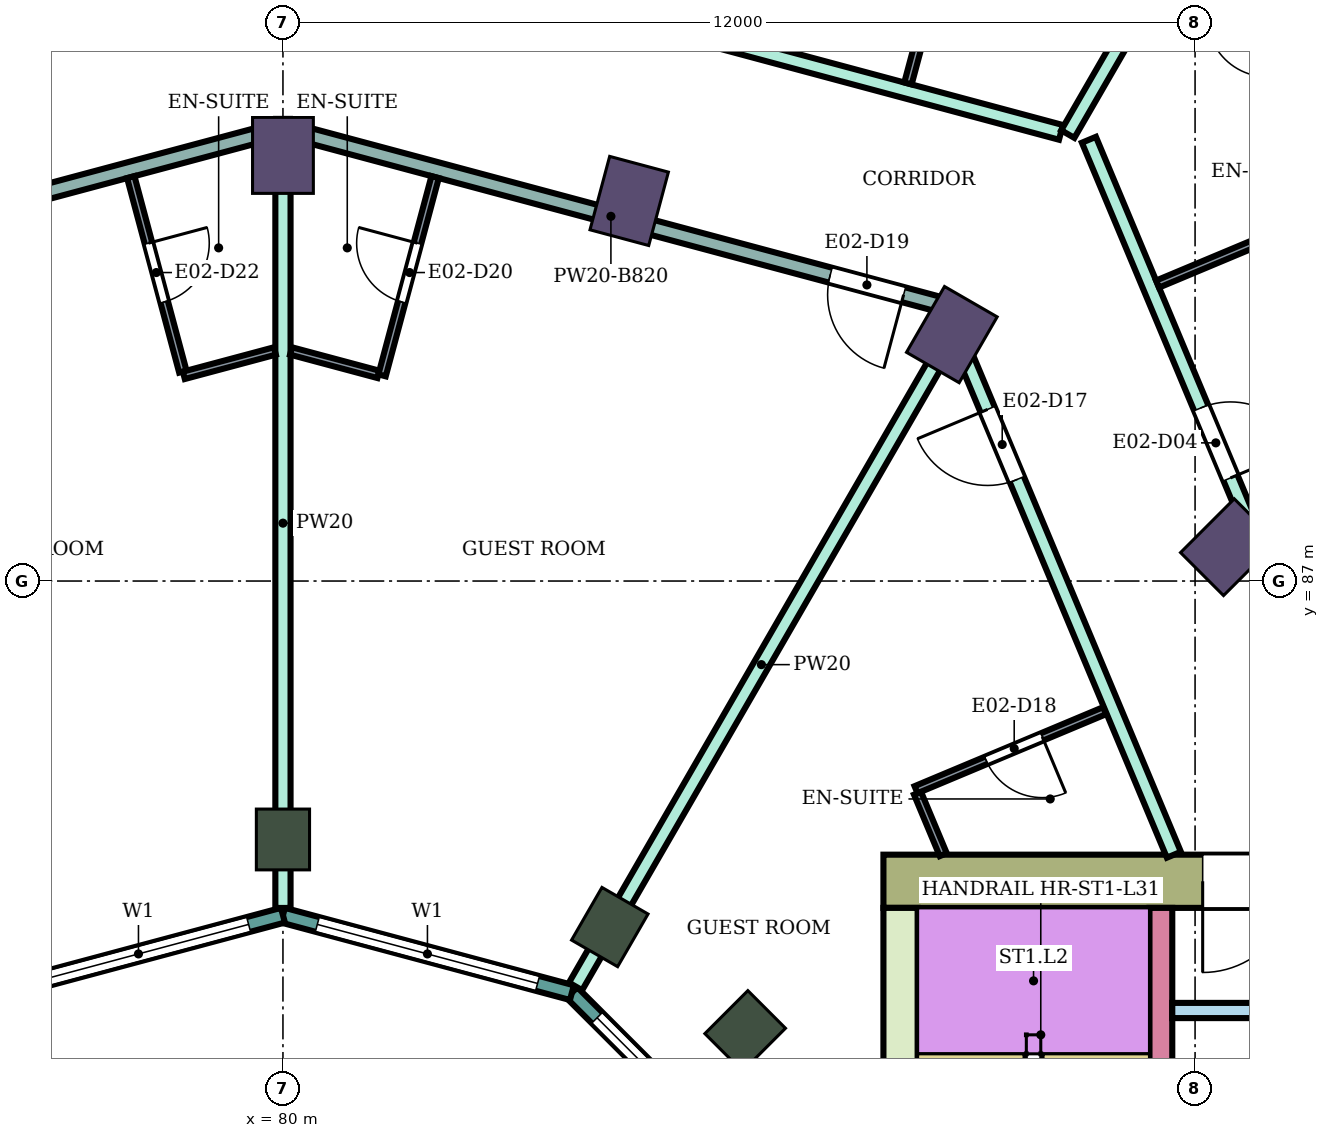
"""IFC4 building model, lengths in metres.
Left out: names, types, materials, properties, quantities, classifications, styles, units other than length and angle.
Written with IfcOpenShell. Run it as: python <this file> out.ifc"""

import sys

from ifc_helpers import new_model, si_unit, direction, frame, frame_2d, origin, origin_2d, place, context, subcontext, project, spatial, rectangle, extrude, element, fill, save


model = new_model("IFC4")
c1 = context("Model", 3, precision=1e-05, world=origin(), true_north=direction((0.0, 1.0)))
c2 = subcontext(c1, "Body", "Model", "MODEL_VIEW")
j1 = project(units=[si_unit("LENGTHUNIT", "METRE"), si_unit("PLANEANGLEUNIT", "RADIAN")], contexts=[c1])
p1 = place(None, origin())
s1 = spatial("IfcSite", under=j1, at=p1, CompositionType="ELEMENT")
p2 = place(p1, origin())
s2 = spatial("IfcBuilding", under=s1, at=p2, CompositionType="ELEMENT")
p3 = place(p2, frame((0.0, 0.0, 134.1)))
s3 = spatial("IfcBuildingStorey", under=s2, at=p3, CompositionType="ELEMENT", Elevation=134.1)
for number, where, z_axis, x_axis in (
    (1, (92.445, 87.445, 0.0), (0.0, 0.0, 1.0), (0.707, 0.707, 0.0)),
    (2, (88.8, 90.242, 0.0), (0.0, 0.0, 1.0), (0.5, 0.866, 0.0)),
    (3, (84.555, 92.0, 0.0), (0.0, 0.0, 1.0), (0.259, 0.966, 0.0)),
    (4, (80.0, 92.6, 0.0), (0.0, 0.0, 1.0), (0.0, 1.0, 0.0)),
):
    element("IfcColumn", number, at=place(p3, frame(where, z_axis=z_axis, x_axis=x_axis)), inside=s3, PredefinedType="COLUMN", context=c2, shape_type="SweptSolid", body=[
        extrude(rectangle(XDim=1.0, YDim=0.8, at=origin_2d()), origin(), (0.0, 0.0, 1.0), 3.9),
    ])
for number, where, z_axis, x_axis in (
    (5, (86.081, 81.081, 0.0), (0.0, 0.0, 1.0), (0.707, 0.707, 0.0)),
    (6, (84.3, 82.448, 0.0), (0.0, 0.0, 1.0), (0.5, 0.866, 0.0)),
    (7, (80.0, 83.6, 0.0), (0.0, 0.0, 1.0), (0.0, 1.0, 0.0)),
):
    element("IfcColumn", number, at=place(p3, frame(where, z_axis=z_axis, x_axis=x_axis)), inside=s3, PredefinedType="COLUMN", context=c2, shape_type="SweptSolid", body=[
        extrude(rectangle(XDim=0.8, YDim=0.7, at=origin_2d()), origin(), (0.0, 0.0, 1.0), 3.9),
    ])
p4 = place(p3, frame((87.9, 83.05, 0.0), z_axis=(0.0, 0.0, 1.0), x_axis=(1.0, 0.0, 0.0)))
e8 = element("IfcWall", 8, at=p4, inside=s3, PredefinedType="SHEAR", context=c2, shape_type="SweptSolid", body=[
    extrude(rectangle(XDim=14.8, YDim=0.7, at=frame_2d((7.4, 0.0))), origin(), (0.0, 0.0, 1.0), 3.58),
])
p5 = place(p4, frame((4.2, 0.0, 0.0)))
e9 = element("IfcOpeningElement", 9, at=p5, cuts=e8, PredefinedType="OPENING", context=c2, shape_type="SweptSolid", body=[
    extrude(rectangle(XDim=2.4, YDim=2.4, at=frame_2d((1.2, 1.2))), frame((0.0, 0.36, 0.0), z_axis=(0.0, -1.0, 0.0), x_axis=(1.0, 0.0, 0.0)), (0.0, 0.0, 1.0), 0.72),
])
p6 = place(p3, frame((88.125, 75.0, 0.0), z_axis=(0.0, 0.0, 1.0), x_axis=(0.0, 1.0, 0.0)))
e10 = element("IfcWall", 10, at=p6, inside=s3, PredefinedType="SHEAR", context=c2, shape_type="SweptSolid", body=[
    extrude(rectangle(XDim=7.7, YDim=0.45, at=frame_2d((3.85, 0.0))), origin(), (0.0, 0.0, 1.0), 3.58),
])
p7 = place(p3, frame((91.55, 75.0, 0.0), z_axis=(0.0, 0.0, 1.0), x_axis=(0.0, 1.0, 0.0)))
e11 = element("IfcWall", 11, at=p7, inside=s3, PredefinedType="SHEAR", context=c2, shape_type="SweptSolid", body=[
    extrude(rectangle(XDim=7.7, YDim=0.3, at=frame_2d((3.85, 0.0))), origin(), (0.0, 0.0, 1.0), 3.58),
])
p8 = place(p7, frame((1.85, 0.0, 0.0)))
e12 = element("IfcOpeningElement", 12, at=p8, cuts=e11, PredefinedType="OPENING", context=c2, shape_type="SweptSolid", body=[
    extrude(rectangle(XDim=0.9, YDim=2.1, at=frame_2d((0.45, 1.05))), frame((0.0, 0.16, 0.0), z_axis=(0.0, -1.0, 0.0), x_axis=(1.0, 0.0, 0.0)), (0.0, 0.0, 1.0), 0.32),
])
p9 = place(p3, frame((91.7, 81.35, 0.0), z_axis=(0.0, 0.0, 1.0), x_axis=(1.0, 0.0, 0.0)))
e13 = element("IfcWall", 13, at=p9, inside=s3, PredefinedType="SHEAR", context=c2, shape_type="SweptSolid", body=[
    extrude(rectangle(XDim=4.5, YDim=0.2, at=frame_2d((2.25, 0.0))), origin(), (0.0, 0.0, 1.0), 3.58),
])
p10 = place(p3, frame((86.585, 78.802, 0.0), z_axis=(0.0, 0.0, 1.0), x_axis=(-0.707106781187, 0.707106781187, 0.0)))
e14 = element("IfcWall", 14, at=p10, inside=s3, PredefinedType="NOTDEFINED", context=c2, shape_type="SweptSolid", body=[
    extrude(rectangle(XDim=3.936, YDim=0.2, at=frame_2d((1.968, 0.0))), origin(), (0.0, 0.0, 1.0), 3.9),
])
p11 = place(p10, frame((0.468, 0.0, 0.9)))
e15 = element("IfcOpeningElement", 15, at=p11, cuts=e14, PredefinedType="OPENING", context=c2, shape_type="SweptSolid", body=[
    extrude(rectangle(XDim=3.0, YDim=2.3, at=frame_2d((1.5, 1.15))), frame((0.0, 0.11, 0.0), z_axis=(0.0, -1.0, 0.0), x_axis=(1.0, 0.0, 0.0)), (0.0, 0.0, 1.0), 0.22),
])
p12 = place(p3, frame((83.802, 81.585, 0.0), z_axis=(0.0, 0.0, 1.0), x_axis=(-0.965933654434, 0.258789828301, 0.0)))
e16 = element("IfcWall", 16, at=p12, inside=s3, PredefinedType="NOTDEFINED", context=c2, shape_type="SweptSolid", body=[
    extrude(rectangle(XDim=3.936, YDim=0.2, at=frame_2d((1.968, 0.0))), origin(), (0.0, 0.0, 1.0), 3.9),
])
p13 = place(p12, frame((0.468, 0.0, 0.9)))
e17 = element("IfcOpeningElement", 17, at=p13, cuts=e16, PredefinedType="OPENING", context=c2, shape_type="SweptSolid", body=[
    extrude(rectangle(XDim=3.0, YDim=2.3, at=frame_2d((1.5, 1.15))), frame((0.0, 0.11, 0.0), z_axis=(0.0, -1.0, 0.0), x_axis=(1.0, 0.0, 0.0)), (0.0, 0.0, 1.0), 0.22),
])
p14 = place(p3, frame((80.0, 82.604, 0.0), z_axis=(0.0, 0.0, 1.0), x_axis=(-0.965933654434, -0.258789828301, 0.0)))
e18 = element("IfcWall", 18, at=p14, inside=s3, PredefinedType="NOTDEFINED", context=c2, shape_type="SweptSolid", body=[
    extrude(rectangle(XDim=3.936, YDim=0.2, at=frame_2d((1.968, 0.0))), origin(), (0.0, 0.0, 1.0), 3.9),
])
p15 = place(p14, frame((0.468, 0.0, 0.9)))
e19 = element("IfcOpeningElement", 19, at=p15, cuts=e18, PredefinedType="OPENING", context=c2, shape_type="SweptSolid", body=[
    extrude(rectangle(XDim=3.0, YDim=2.3, at=frame_2d((1.5, 1.15))), frame((0.0, 0.11, 0.0), z_axis=(0.0, -1.0, 0.0), x_axis=(1.0, 0.0, 0.0)), (0.0, 0.0, 1.0), 0.22),
])
p16 = place(p3, frame((69.397, 92.805, 0.0), z_axis=(0.0, 0.0, 1.0), x_axis=(0.965971666602, 0.258647906087, 0.0)))
e20 = element("IfcWall", 20, at=p16, inside=s3, PredefinedType="PARTITIONING", context=c2, shape_type="SweptSolid", body=[
    extrude(rectangle(XDim=10.887, YDim=0.2, at=frame_2d((5.443, 0.0))), origin(), (0.0, 0.0, 1.0), 3.45),
])
p17 = place(p16, frame((6.163, 0.0, 0.0)))
e21 = element("IfcOpeningElement", 21, at=p17, cuts=e20, PredefinedType="OPENING", context=c2, shape_type="SweptSolid", body=[
    extrude(rectangle(XDim=1.0, YDim=2.1, at=frame_2d((0.5, 1.05))), frame((0.0, 0.11, 0.0), z_axis=(0.0, -1.0, 0.0), x_axis=(1.0, 0.0, 0.0)), (0.0, 0.0, 1.0), 0.22),
])
p18 = place(p16, frame((2.461, 0.0, 0.0)))
e22 = element("IfcOpeningElement", 22, at=p18, cuts=e20, PredefinedType="OPENING", context=c2, shape_type="SweptSolid", body=[
    extrude(rectangle(XDim=1.0, YDim=2.1, at=frame_2d((0.5, 1.05))), frame((0.0, 0.11, 0.0), z_axis=(0.0, -1.0, 0.0), x_axis=(1.0, 0.0, 0.0)), (0.0, 0.0, 1.0), 0.22),
])
p19 = place(p3, frame((71.303, 90.625, 0.0), z_axis=(0.0, 0.0, 1.0), x_axis=(0.965971868307, 0.258647152776, 0.0)))
e23 = element("IfcWall", 23, at=p19, inside=s3, PredefinedType="PARTITIONING", context=c2, shape_type="SweptSolid", body=[
    extrude(rectangle(XDim=8.874, YDim=0.2, at=frame_2d((4.437, 0.0))), origin(), (0.0, 0.0, 1.0), 3.08),
])
p20 = place(p19, frame((0.55, 0.0, 0.0)))
e24 = element("IfcOpeningElement", 24, at=p20, cuts=e23, PredefinedType="OPENING", context=c2, shape_type="SweptSolid", body=[
    extrude(rectangle(XDim=1.0, YDim=2.1, at=frame_2d((0.5, 1.05))), frame((0.0, 0.11, 0.0), z_axis=(0.0, -1.0, 0.0), x_axis=(1.0, 0.0, 0.0)), (0.0, 0.0, 1.0), 0.22),
])
p21 = place(p3, frame((80.0, 82.699, 0.0), z_axis=(0.0, 0.0, 1.0), x_axis=(0.0, 1.0, 0.0)))
e25 = element("IfcWall", 25, at=p21, inside=s3, PredefinedType="PARTITIONING", context=c2, shape_type="SweptSolid", body=[
    extrude(rectangle(XDim=10.125, YDim=0.2, at=frame_2d((5.062, 0.0))), origin(), (0.0, 0.0, 1.0), 3.45),
])
p22 = place(p3, frame((80.0, 92.954, 0.0), z_axis=(0.0, 0.0, 1.0), x_axis=(0.96592536278, -0.258820774936, 0.0)))
e26 = element("IfcWall", 26, at=p22, inside=s3, PredefinedType="PARTITIONING", context=c2, shape_type="SweptSolid", body=[
    extrude(rectangle(XDim=8.934, YDim=0.2, at=frame_2d((4.467, 0.0))), origin(), (0.0, 0.0, 1.0), 3.08),
])
p23 = place(p22, frame((7.454, 0.0, 0.0)))
e27 = element("IfcOpeningElement", 27, at=p23, cuts=e26, PredefinedType="OPENING", context=c2, shape_type="SweptSolid", body=[
    extrude(rectangle(XDim=1.0, YDim=2.1, at=frame_2d((0.5, 1.05))), frame((0.0, 0.11, 0.0), z_axis=(0.0, -1.0, 0.0), x_axis=(1.0, 0.0, 0.0)), (0.0, 0.0, 1.0), 0.22),
])
p24 = place(p3, frame((80.0, 95.648, 0.0), z_axis=(0.0, 0.0, 1.0), x_axis=(0.965852259202, -0.259093445292, 0.0)))
e28 = element("IfcWall", 28, at=p24, inside=s3, PredefinedType="PARTITIONING", context=c2, shape_type="SweptSolid", body=[
    extrude(rectangle(XDim=10.597, YDim=0.2, at=frame_2d((5.298, 0.0))), origin(), (0.0, 0.0, 1.0), 3.45),
])
p25 = place(p24, frame((1.0, 0.0, 0.0)))
e29 = element("IfcOpeningElement", 29, at=p25, cuts=e28, PredefinedType="OPENING", context=c2, shape_type="SweptSolid", body=[
    extrude(rectangle(XDim=1.0, YDim=2.1, at=frame_2d((0.5, 1.05))), frame((0.0, 0.11, 0.0), z_axis=(0.0, -1.0, 0.0), x_axis=(1.0, 0.0, 0.0)), (0.0, 0.0, 1.0), 0.22),
])
p26 = place(p3, frame((83.85, 81.667, 0.0), z_axis=(0.0, 0.0, 1.0), x_axis=(0.500092047414, 0.865972253663, 0.0)))
e30 = element("IfcWall", 30, at=p26, inside=s3, PredefinedType="PARTITIONING", context=c2, shape_type="SweptSolid", body=[
    extrude(rectangle(XDim=9.778, YDim=0.2, at=frame_2d((4.889, 0.0))), origin(), (0.0, 0.0, 1.0), 3.45),
])
p27 = place(p3, frame((88.698, 90.624, 0.0), z_axis=(0.0, 0.0, 1.0), x_axis=(0.386027055918, -0.922487459047, 0.0)))
e31 = element("IfcWall", 31, at=p27, inside=s3, PredefinedType="PARTITIONING", context=c2, shape_type="SweptSolid", body=[
    extrude(rectangle(XDim=7.832, YDim=0.2, at=frame_2d((3.916, 0.0))), origin(), (0.0, 0.0, 1.0), 3.45),
])
p28 = place(p27, frame((1.482, 0.0, 0.0)))
e32 = element("IfcOpeningElement", 32, at=p28, cuts=e31, PredefinedType="OPENING", context=c2, shape_type="SweptSolid", body=[
    extrude(rectangle(XDim=1.0, YDim=2.1, at=frame_2d((0.5, 1.05))), frame((0.0, 0.11, 0.0), z_axis=(0.0, -1.0, 0.0), x_axis=(1.0, 0.0, 0.0)), (0.0, 0.0, 1.0), 0.22),
])
p29 = place(p3, frame((90.325, 92.88, 0.0), z_axis=(0.0, 0.0, 1.0), x_axis=(0.500084891114, 0.865976386329, 0.0)))
e33 = element("IfcWall", 33, at=p29, inside=s3, PredefinedType="PARTITIONING", context=c2, shape_type="SweptSolid", body=[
    extrude(rectangle(XDim=5.15, YDim=0.2, at=frame_2d((2.575, 0.0))), origin(), (0.0, 0.0, 1.0), 3.45),
])
p30 = place(p3, frame((90.604, 92.805, 0.0), z_axis=(0.0, 0.0, 1.0), x_axis=(0.386199042801, -0.922415470024, 0.0)))
e34 = element("IfcWall", 34, at=p30, inside=s3, PredefinedType="PARTITIONING", context=c2, shape_type="SweptSolid", body=[
    extrude(rectangle(XDim=8.48, YDim=0.2, at=frame_2d((4.24, 0.0))), origin(), (0.0, 0.0, 1.0), 3.45),
])
p31 = place(p30, frame((3.823, 0.0, 0.0)))
e35 = element("IfcOpeningElement", 35, at=p31, cuts=e34, PredefinedType="OPENING", context=c2, shape_type="SweptSolid", body=[
    extrude(rectangle(XDim=1.0, YDim=2.1, at=frame_2d((0.5, 1.05))), frame((0.0, 0.11, 0.0), z_axis=(0.0, -1.0, 0.0), x_axis=(1.0, 0.0, 0.0)), (0.0, 0.0, 1.0), 0.22),
])
p32 = place(p3, frame((77.998, 92.314, 0.0), z_axis=(0.0, 0.0, 1.0), x_axis=(0.258608674509, -0.965982170368, 0.0)))
e36 = element("IfcWall", 36, at=p32, inside=s3, PredefinedType="PARTITIONING", context=c2, shape_type="SweptSolid", body=[
    extrude(rectangle(XDim=2.65, YDim=0.1, at=frame_2d((1.325, 0.0))), origin(), (0.0, 0.0, 1.0), 3.45),
])
p33 = place(p32, frame((0.9, 0.0, 0.0)))
e37 = element("IfcOpeningElement", 37, at=p33, cuts=e36, PredefinedType="OPENING", context=c2, shape_type="SweptSolid", body=[
    extrude(rectangle(XDim=0.8, YDim=2.1, at=frame_2d((0.4, 1.05))), frame((0.0, 0.06, 0.0), z_axis=(0.0, -1.0, 0.0), x_axis=(1.0, 0.0, 0.0)), (0.0, 0.0, 1.0), 0.12),
])
p34 = place(p3, frame((78.696, 89.706, 0.0), z_axis=(0.0, 0.0, 1.0), x_axis=(0.966002513606, 0.258532674351, 0.0)))
e38 = element("IfcWall", 38, at=p34, inside=s3, PredefinedType="PARTITIONING", context=c2, shape_type="SweptSolid", body=[
    extrude(rectangle(XDim=1.24, YDim=0.1, at=frame_2d((0.62, 0.0))), origin(), (0.0, 0.0, 1.0), 3.45),
])
p35 = place(p3, frame((80.106, 90.027, 0.0), z_axis=(0.0, 0.0, 1.0), x_axis=(0.966002973184, -0.258530957139, 0.0)))
e39 = element("IfcWall", 39, at=p35, inside=s3, PredefinedType="PARTITIONING", context=c2, shape_type="SweptSolid", body=[
    extrude(rectangle(XDim=1.19, YDim=0.1, at=frame_2d((0.595, 0.0))), origin(), (0.0, 0.0, 1.0), 3.45),
])
p36 = place(p3, frame((81.304, 89.706, 0.0), z_axis=(0.0, 0.0, 1.0), x_axis=(0.258608022684, 0.965982344872, 0.0)))
e40 = element("IfcWall", 40, at=p36, inside=s3, PredefinedType="PARTITIONING", context=c2, shape_type="SweptSolid", body=[
    extrude(rectangle(XDim=2.7, YDim=0.1, at=frame_2d((1.35, 0.0))), origin(), (0.0, 0.0, 1.0), 3.45),
])
p37 = place(p36, frame((1.0, 0.0, 0.0)))
e41 = element("IfcOpeningElement", 41, at=p37, cuts=e40, PredefinedType="OPENING", context=c2, shape_type="SweptSolid", body=[
    extrude(rectangle(XDim=0.8, YDim=2.1, at=frame_2d((0.4, 1.05))), frame((0.0, 0.06, 0.0), z_axis=(0.0, -1.0, 0.0), x_axis=(1.0, 0.0, 0.0)), (0.0, 0.0, 1.0), 0.12),
])
p38 = place(p3, frame((88.223, 93.547, 0.0), z_axis=(0.0, 0.0, 1.0), x_axis=(0.259021640683, 0.965871518194, 0.0)))
e42 = element("IfcWall", 42, at=p38, inside=s3, PredefinedType="PARTITIONING", context=c2, shape_type="SweptSolid", body=[
    extrude(rectangle(XDim=2.649, YDim=0.1, at=frame_2d((1.325, 0.0))), origin(), (0.0, 0.0, 1.0), 3.45),
])
p39 = place(p3, frame((88.348, 84.209, 0.0), z_axis=(0.0, 0.0, 1.0), x_axis=(0.386077497504, -0.922466349479, 0.0)))
e43 = element("IfcWall", 43, at=p39, inside=s3, PredefinedType="PARTITIONING", context=c2, shape_type="SweptSolid", body=[
    extrude(rectangle(XDim=0.877, YDim=0.1, at=frame_2d((0.438, 0.0))), origin(), (0.0, 0.0, 1.0), 3.45),
])
p40 = place(p3, frame((88.329, 84.255, 0.0), z_axis=(0.0, 0.0, 1.0), x_axis=(0.922320663728, 0.386425404522, 0.0)))
e44 = element("IfcWall", 44, at=p40, inside=s3, PredefinedType="PARTITIONING", context=c2, shape_type="SweptSolid", body=[
    extrude(rectangle(XDim=2.69, YDim=0.1, at=frame_2d((1.345, 0.0))), origin(), (0.0, 0.0, 1.0), 3.45),
])
p41 = place(p40, frame((1.0, 0.0, 0.0)))
e45 = element("IfcOpeningElement", 45, at=p41, cuts=e44, PredefinedType="OPENING", context=c2, shape_type="SweptSolid", body=[
    extrude(rectangle(XDim=0.8, YDim=2.1, at=frame_2d((0.4, 1.05))), frame((0.0, 0.06, 0.0), z_axis=(0.0, -1.0, 0.0), x_axis=(1.0, 0.0, 0.0)), (0.0, 0.0, 1.0), 0.12),
])
p42 = place(p3, frame((91.507, 90.907, 0.0), z_axis=(0.0, 0.0, 1.0), x_axis=(0.922344808264, 0.38636777126, 0.0)))
e46 = element("IfcWall", 46, at=p42, inside=s3, PredefinedType="PARTITIONING", context=c2, shape_type="SweptSolid", body=[
    extrude(rectangle(XDim=2.65, YDim=0.1, at=frame_2d((1.325, 0.0))), origin(), (0.0, 0.0, 1.0), 3.45),
])
p43 = place(p3, frame((92.289, 96.03, 0.0), z_axis=(0.0, 0.0, 1.0), x_axis=(0.386237487323, -0.922399373041, 0.0)))
e47 = element("IfcWall", 47, at=p43, inside=s3, PredefinedType="PARTITIONING", context=c2, shape_type="SweptSolid", body=[
    extrude(rectangle(XDim=4.423, YDim=0.1, at=frame_2d((2.211, 0.0))), origin(), (0.0, 0.0, 1.0), 2.68),
])
p44 = place(p43, frame((1.731, 0.0, 0.0)))
e48 = element("IfcOpeningElement", 48, at=p44, cuts=e47, PredefinedType="OPENING", context=c2, shape_type="SweptSolid", body=[
    extrude(rectangle(XDim=0.8, YDim=2.1, at=frame_2d((0.4, 1.05))), frame((0.0, 0.06, 0.0), z_axis=(0.0, -1.0, 0.0), x_axis=(1.0, 0.0, 0.0)), (0.0, 0.0, 1.0), 0.12),
])
p45 = place(p11, origin())
e49 = element("IfcWindow", 49, at=p45, inside=s3, PartitioningType="SINGLE_PANEL", PredefinedType="WINDOW", context=c2, shape_type="SweptSolid", body=[
    extrude(rectangle(XDim=3.0, YDim=2.3, at=frame_2d((1.5, 1.15))), frame((0.0, 0.03, 0.0), z_axis=(0.0, -1.0, 0.0), x_axis=(1.0, 0.0, 0.0)), (0.0, 0.0, 1.0), 0.06),
])
fill(e15, e49)
p46 = place(p13, origin())
e50 = element("IfcWindow", 50, at=p46, inside=s3, PartitioningType="SINGLE_PANEL", PredefinedType="WINDOW", context=c2, shape_type="SweptSolid", body=[
    extrude(rectangle(XDim=3.0, YDim=2.3, at=frame_2d((1.5, 1.15))), frame((0.0, 0.03, 0.0), z_axis=(0.0, -1.0, 0.0), x_axis=(1.0, 0.0, 0.0)), (0.0, 0.0, 1.0), 0.06),
])
fill(e17, e50)
p47 = place(p15, origin())
e51 = element("IfcWindow", 51, at=p47, inside=s3, PartitioningType="SINGLE_PANEL", PredefinedType="WINDOW", context=c2, shape_type="SweptSolid", body=[
    extrude(rectangle(XDim=3.0, YDim=2.3, at=frame_2d((1.5, 1.15))), frame((0.0, 0.03, 0.0), z_axis=(0.0, -1.0, 0.0), x_axis=(1.0, 0.0, 0.0)), (0.0, 0.0, 1.0), 0.06),
])
fill(e19, e51)
p48 = place(p31, origin())
e52 = element("IfcDoor", 52, at=p48, inside=s3, OperationType="SINGLE_SWING_RIGHT", PredefinedType="DOOR", context=c2, shape_type="SweptSolid", body=[
    extrude(rectangle(XDim=1.0, YDim=2.1, at=frame_2d((0.5, 1.05))), frame((0.0, 0.025, 0.0), z_axis=(0.0, -1.0, 0.0), x_axis=(1.0, 0.0, 0.0)), (0.0, 0.0, 1.0), 0.05),
])
fill(e35, e52)
p49 = place(p28, frame((1.0, 0.0, 0.0), z_axis=(0.0, 0.0, 1.0), x_axis=(-1.0, 0.0, 0.0)))
e53 = element("IfcDoor", 53, at=p49, inside=s3, OperationType="SINGLE_SWING_RIGHT", PredefinedType="DOOR", context=c2, shape_type="SweptSolid", body=[
    extrude(rectangle(XDim=1.0, YDim=2.1, at=frame_2d((0.5, 1.05))), frame((0.0, 0.025, 0.0), z_axis=(0.0, -1.0, 0.0), x_axis=(1.0, 0.0, 0.0)), (0.0, 0.0, 1.0), 0.05),
])
fill(e32, e53)
p50 = place(p41, frame((0.8, 0.0, 0.0), z_axis=(0.0, 0.0, 1.0), x_axis=(-1.0, 0.0, 0.0)))
e54 = element("IfcDoor", 54, at=p50, inside=s3, OperationType="SINGLE_SWING_LEFT", PredefinedType="DOOR", context=c2, shape_type="SweptSolid", body=[
    extrude(rectangle(XDim=0.8, YDim=2.1, at=frame_2d((0.4, 1.05))), frame((0.0, 0.025, 0.0), z_axis=(0.0, -1.0, 0.0), x_axis=(1.0, 0.0, 0.0)), (0.0, 0.0, 1.0), 0.05),
])
fill(e45, e54)
p51 = place(p23, frame((1.0, 0.0, 0.0), z_axis=(0.0, 0.0, 1.0), x_axis=(-1.0, 0.0, 0.0)))
e55 = element("IfcDoor", 55, at=p51, inside=s3, OperationType="SINGLE_SWING_LEFT", PredefinedType="DOOR", context=c2, shape_type="SweptSolid", body=[
    extrude(rectangle(XDim=1.0, YDim=2.1, at=frame_2d((0.5, 1.05))), frame((0.0, 0.025, 0.0), z_axis=(0.0, -1.0, 0.0), x_axis=(1.0, 0.0, 0.0)), (0.0, 0.0, 1.0), 0.05),
])
fill(e27, e55)
p52 = place(p37, origin())
e56 = element("IfcDoor", 56, at=p52, inside=s3, OperationType="SINGLE_SWING_RIGHT", PredefinedType="DOOR", context=c2, shape_type="SweptSolid", body=[
    extrude(rectangle(XDim=0.8, YDim=2.1, at=frame_2d((0.4, 1.05))), frame((0.0, 0.025, 0.0), z_axis=(0.0, -1.0, 0.0), x_axis=(1.0, 0.0, 0.0)), (0.0, 0.0, 1.0), 0.05),
])
fill(e41, e56)
p53 = place(p33, origin())
e57 = element("IfcDoor", 57, at=p53, inside=s3, OperationType="SINGLE_SWING_LEFT", PredefinedType="DOOR", context=c2, shape_type="SweptSolid", body=[
    extrude(rectangle(XDim=0.8, YDim=2.1, at=frame_2d((0.4, 1.05))), frame((0.0, 0.025, 0.0), z_axis=(0.0, -1.0, 0.0), x_axis=(1.0, 0.0, 0.0)), (0.0, 0.0, 1.0), 0.05),
])
fill(e37, e57)
p54 = place(p5, frame((2.4, 0.0, 0.0), z_axis=(0.0, 0.0, 1.0), x_axis=(-1.0, 0.0, 0.0)))
e58 = element("IfcDoor", 58, at=p54, inside=s3, OperationType="DOUBLE_DOOR_SINGLE_SWING", PredefinedType="DOOR", context=c2, shape_type="SweptSolid", body=[
    extrude(rectangle(XDim=2.4, YDim=2.4, at=frame_2d((1.2, 1.2))), frame((0.0, 0.025, 0.0), z_axis=(0.0, -1.0, 0.0), x_axis=(1.0, 0.0, 0.0)), (0.0, 0.0, 1.0), 0.05),
])
fill(e9, e58)
save(model, sys.argv[1])
